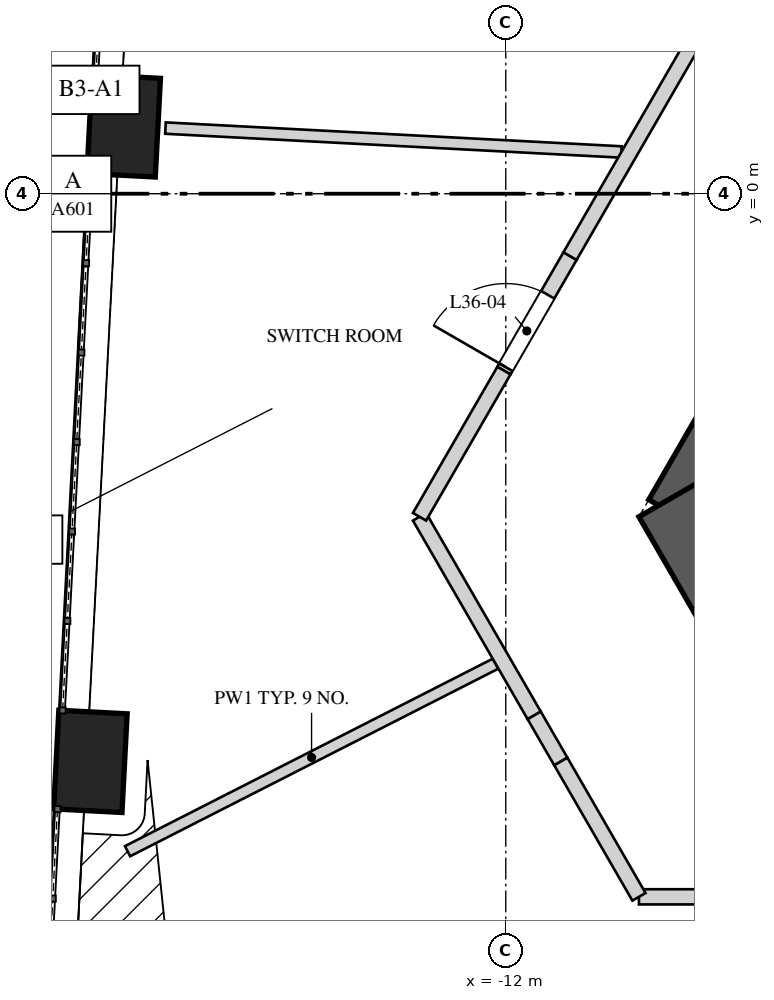
"""IFC4 building model, lengths in metres.
Left out: names, types, materials, properties, quantities, classifications, styles, units other than length and angle.
Written with IfcOpenShell. Run it as: python <this file> out.ifc"""

import sys

from ifc_helpers import new_model, si_unit, direction, frame, frame_2d, origin, origin_2d, place, context, subcontext, project, spatial, polyline, rectangle, outline, extrude, element, fill, save


model = new_model("IFC4")
c1 = context("Model", 3, precision=1e-05, world=origin(), true_north=direction((0.0, 1.0)))
c2 = subcontext(c1, "Body", "Model", "MODEL_VIEW")
j1 = project(units=[si_unit("LENGTHUNIT", "METRE"), si_unit("PLANEANGLEUNIT", "RADIAN")], contexts=[c1])
p1 = place(None, origin())
s1 = spatial("IfcSite", under=j1, at=p1, CompositionType="ELEMENT")
p2 = place(p1, origin())
s2 = spatial("IfcBuilding", under=s1, at=p2, CompositionType="ELEMENT")
p3 = place(p2, frame((0.0, 0.0, 157.6)))
s3 = spatial("IfcBuildingStorey", under=s2, at=p3, CompositionType="ELEMENT", Elevation=157.6)
p4 = place(p3, frame((-1.184, 10.55, 0.0), z_axis=(0.0, 0.0, 1.0), x_axis=(-0.500004814304, -0.866022624227, 0.0)))
e1 = element("IfcWall", 1, at=p4, inside=s3, PredefinedType="SHEAR", context=c2, shape_type="SweptSolid", body=[
    extrude(rectangle(XDim=17.09, YDim=0.9, at=frame_2d((8.545, 0.0))), origin(), (0.0, 0.0, 1.0), 5.2),
])
p5 = place(p4, frame((6.75, 0.0, 0.0)))
e2 = element("IfcOpeningElement", 2, at=p5, cuts=e1, PredefinedType="OPENING", context=c2, shape_type="SweptSolid", body=[
    extrude(rectangle(XDim=1.0, YDim=2.4, at=frame_2d((0.5, 1.2))), frame((0.0, 0.46, 0.0), z_axis=(0.0, -1.0, 0.0), x_axis=(1.0, 0.0, 0.0)), (0.0, 0.0, 1.0), 0.92),
])
p6 = place(p3, frame((-9.858, -4.025, 0.0), z_axis=(0.0, 0.0, 1.0), x_axis=(0.500059191753, -0.865991226713, 0.0)))
e3 = element("IfcWall", 3, at=p6, inside=s3, PredefinedType="SHEAR", context=c2, shape_type="SweptSolid", body=[
    extrude(rectangle(XDim=2.887, YDim=0.9, at=frame_2d((1.443, 0.0))), origin(), (0.0, 0.0, 1.0), 5.2),
])
for number, where, z_axis, x_axis in (
    (4, (-17.027, 0.892, 0.0), (0.0, 0.0, 1.0), (-0.052, -0.999, 0.0)),
    (5, (-17.465, -7.468, 0.0), (0.0, 0.0, 1.0), (-0.052, -0.999, 0.0)),
):
    element("IfcColumn", number, at=place(p3, frame(where, z_axis=z_axis, x_axis=x_axis)), inside=s3, PredefinedType="COLUMN", context=c2, shape_type="SweptSolid", body=[
        extrude(rectangle(XDim=1.3, YDim=0.9, at=origin_2d()), origin(), (0.0, 0.0, 1.0), 2.835),
    ])
p7 = place(p3, frame((-12.134, -6.183, 0.0), z_axis=(0.0, 0.0, 1.0), x_axis=(-0.891023038557, -0.45395808701, 0.0)))
e6 = element("IfcWall", 6, at=p7, inside=s3, PredefinedType="PARTITIONING", context=c2, shape_type="SweptSolid", body=[
    extrude(rectangle(XDim=5.434, YDim=0.15, at=frame_2d((2.717, 0.0))), origin(), (0.0, 0.0, 1.0), 4.85),
])
p8 = place(p3, frame((-10.479, 0.549, 0.0), z_axis=(0.0, 0.0, 1.0), x_axis=(-0.998630600864, 0.052315609692, 0.0)))
e7 = element("IfcWall", 7, at=p8, inside=s3, PredefinedType="PARTITIONING", context=c2, shape_type="SweptSolid", body=[
    extrude(rectangle(XDim=6.006, YDim=0.15, at=frame_2d((3.003, 0.0))), origin(), (0.0, 0.0, 1.0), 4.85),
])
p9 = place(p3, frame((-6.072, -9.35, 0.0), z_axis=(0.0, 0.0, 1.0), x_axis=(-0.544642851203, -0.838668089672, 0.0)))
e8 = element("IfcWall", 8, at=p9, inside=s3, PredefinedType="PARTITIONING", context=c2, shape_type="SweptSolid", body=[
    extrude(rectangle(XDim=9.539, YDim=0.15, at=frame_2d((4.77, 0.0))), origin(), (0.0, 0.0, 1.0), 4.85),
])
p10 = place(p3, frame((-8.679, -9.25, 0.0), z_axis=(0.0, 0.0, 1.0), x_axis=(-1.0, 0.0, 0.0)))
e9 = element("IfcWall", 9, at=p10, inside=s3, PredefinedType="SOLIDWALL", context=c2, shape_type="SweptSolid", body=[
    extrude(rectangle(XDim=1.569, YDim=0.2, at=frame_2d((0.784, 0.0))), origin(), (0.0, 0.0, 1.0), 4.85),
])
p11 = place(p3, frame((-10.248, -9.25, 0.0), z_axis=(0.0, 0.0, 1.0), x_axis=(-0.499941542975, 0.866059151333, 0.0)))
e10 = element("IfcWall", 10, at=p11, inside=s3, PredefinedType="SOLIDWALL", context=c2, shape_type="SweptSolid", body=[
    extrude(rectangle(XDim=2.058, YDim=0.2, at=frame_2d((1.029, 0.0))), origin(), (0.0, 0.0, 1.0), 4.85),
])
p12 = place(p3, frame((-11.277, -7.468, 0.0), z_axis=(0.0, 0.0, 1.0), x_axis=(-0.50022532796, 0.865895271535, 0.0)))
e11 = element("IfcWall", 11, at=p12, inside=s3, PredefinedType="SOLIDWALL", context=c2, shape_type="SweptSolid", body=[
    extrude(rectangle(XDim=0.7, YDim=0.2, at=frame_2d((0.35, 0.0))), origin(), (0.0, 0.0, 1.0), 4.15),
])
p13 = place(p3, frame((-11.627, -6.861, 0.0), z_axis=(0.0, 0.0, 1.0), x_axis=(-0.499979445284, 0.86603727073, 0.0)))
e12 = element("IfcWall", 12, at=p13, inside=s3, PredefinedType="SOLIDWALL", context=c2, shape_type="SweptSolid", body=[
    extrude(rectangle(XDim=3.015, YDim=0.2, at=frame_2d((1.508, 0.0))), origin(), (0.0, 0.0, 1.0), 4.85),
])
p14 = place(p3, frame((-13.135, -4.25, 0.0), z_axis=(0.0, 0.0, 1.0), x_axis=(0.499966483153, 0.86604475388, 0.0)))
e13 = element("IfcWall", 13, at=p14, inside=s3, PredefinedType="SOLIDWALL", context=c2, shape_type="SweptSolid", body=[
    extrude(rectangle(XDim=2.223, YDim=0.2, at=frame_2d((1.111, 0.0))), origin(), (0.0, 0.0, 1.0), 4.85),
])
p15 = place(p3, frame((-12.023, -2.325, 0.0), z_axis=(0.0, 0.0, 1.0), x_axis=(0.500038750527, 0.866003030001, 0.0)))
e14 = element("IfcWall", 14, at=p15, inside=s3, PredefinedType="SOLIDWALL", context=c2, shape_type="SweptSolid", body=[
    extrude(outline(polyline([(0.0, 0.0), (1.737, 0.0), (1.737, 4.15), (0.872, 4.15), (0.872, 4.85), (0.0, 4.85), (0.0, 0.0)])), frame((0.0, 0.1, 0.0), z_axis=(0.0, -1.0, 0.0), x_axis=(1.0, 0.0, 0.0)), (0.0, 0.0, 1.0), 0.2),
])
p16 = place(p15, frame((0.05, 0.0, 0.0)))
e15 = element("IfcOpeningElement", 15, at=p16, cuts=e14, PredefinedType="OPENING", context=c2, shape_type="SweptSolid", body=[
    extrude(rectangle(XDim=1.1, YDim=2.2, at=frame_2d((0.55, 1.1))), frame((0.0, 0.11, 0.0), z_axis=(0.0, -1.0, 0.0), x_axis=(1.0, 0.0, 0.0)), (0.0, 0.0, 1.0), 0.22),
])
p17 = place(p3, frame((-11.155, -0.821, 0.0), z_axis=(0.0, 0.0, 1.0), x_axis=(0.499992344383, 0.866029823712, 0.0)))
e16 = element("IfcWall", 16, at=p17, inside=s3, PredefinedType="SOLIDWALL", context=c2, shape_type="SweptSolid", body=[
    extrude(rectangle(XDim=4.307, YDim=0.2, at=frame_2d((2.153, 0.0))), origin(), (0.0, 0.0, 1.0), 4.85),
])
p18 = place(p16, origin())
e17 = element("IfcDoor", 17, at=p18, inside=s3, OperationType="SINGLE_SWING_RIGHT", PredefinedType="DOOR", context=c2, shape_type="SweptSolid", body=[
    extrude(rectangle(XDim=1.1, YDim=2.2, at=frame_2d((0.55, 1.1))), frame((0.0, 0.025, 0.0), z_axis=(0.0, -1.0, 0.0), x_axis=(1.0, 0.0, 0.0)), (0.0, 0.0, 1.0), 0.05),
])
fill(e15, e17)
save(model, sys.argv[1])
